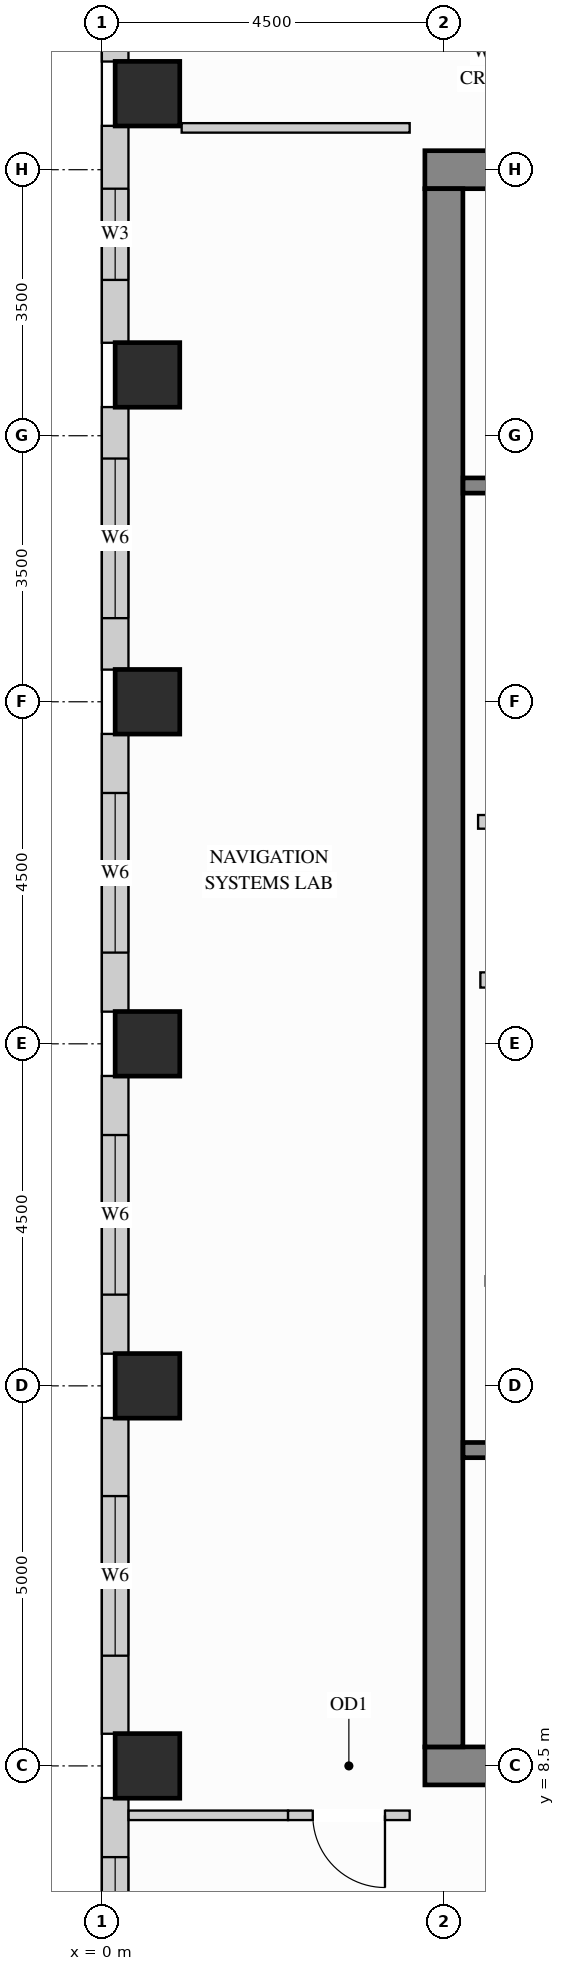
"""IFC4 building model, lengths in metres.
Left out: names, types, materials, properties, quantities, classifications, styles, units other than length and angle.
Written with IfcOpenShell. Run it as: python <this file> out.ifc"""

import sys

from ifc_helpers import new_model, si_unit, direction, frame, frame_2d, origin, origin_2d, place, context, subcontext, project, spatial, rectangle, extrude, source, transform, mapped, element, fill, save


model = new_model("IFC4")
c1 = context("Model", 3, precision=1e-05, world=origin(), true_north=direction((0.0, 1.0)))
c2 = subcontext(c1, "Body", "Model", "MODEL_VIEW")
j1 = project(units=[si_unit("LENGTHUNIT", "METRE"), si_unit("PLANEANGLEUNIT", "RADIAN")], contexts=[c1])
p1 = place(None, origin())
s1 = spatial("IfcSite", under=j1, at=p1, CompositionType="ELEMENT")
p2 = place(p1, origin())
s2 = spatial("IfcBuilding", under=s1, at=p2, CompositionType="ELEMENT")
p3 = place(p2, frame((0.0, 0.0, 255.6)))
s3 = spatial("IfcBuildingStorey", under=s2, at=p3, CompositionType="ELEMENT", Elevation=255.6)
m1 = source(origin(), c2, "Body", "SweptSolid", [
    extrude(rectangle(XDim=0.85, YDim=0.85, at=origin_2d()), origin(), (0.0, 0.0, 1.0), 3.4),
])
for number, where, z_axis, x_axis in (
    (1, (0.6, 13.5, 0.0), (0.0, 0.0, 1.0), (1.0, 0.0, 0.0)),
    (2, (0.6, 18.0, 0.0), (0.0, 0.0, 1.0), (1.0, 0.0, 0.0)),
    (3, (0.6, 22.5, 0.0), (0.0, 0.0, 1.0), (1.0, 0.0, 0.0)),
    (4, (0.6, 26.8, 0.0), (0.0, 0.0, 1.0), (1.0, 0.0, 0.0)),
    (5, (0.6, 30.5, 0.0), (0.0, 0.0, 1.0), (1.0, 0.0, 0.0)),
    (6, (0.6, 8.5, 0.0), (0.0, 0.0, 1.0), (1.0, 0.0, 0.0)),
):
    element("IfcColumn", number, at=place(p3, frame(where, z_axis=z_axis, x_axis=x_axis)), inside=s3, PredefinedType="COLUMN", context=c2, shape_type="MappedRepresentation", body=[
        mapped(m1, transform((0.0, 0.0, 0.0), x_axis=(1.0, 0.0, 0.0), y_axis=(0.0, 1.0, 0.0), z_axis=(0.0, 0.0, 1.0))),
    ])
m2 = source(origin(), c2, "Body", "SweptSolid", [
    extrude(rectangle(XDim=10.5, YDim=0.5, at=frame_2d((5.25, 0.0))), origin(), (0.0, 0.0, 1.0), 3.4),
])
for number, where, z_axis, x_axis in (
    (7, (4.25, 29.5, 0.0), (0.0, 0.0, 1.0), (1.0, 0.0, 0.0)),
    (8, (4.25, 8.5, 0.0), (0.0, 0.0, 1.0), (1.0, 0.0, 0.0)),
):
    element("IfcWall", number, at=place(p3, frame(where, z_axis=z_axis, x_axis=x_axis)), inside=s3, PredefinedType="SHEAR", context=c2, shape_type="MappedRepresentation", body=[
        mapped(m2, transform((0.0, 0.0, 0.0), x_axis=(1.0, 0.0, 0.0), y_axis=(0.0, 1.0, 0.0), z_axis=(0.0, 0.0, 1.0))),
    ])
m3 = source(origin(), c2, "Body", "SweptSolid", [
    extrude(rectangle(XDim=20.5, YDim=0.5, at=frame_2d((10.25, 0.0))), origin(), (0.0, 0.0, 1.0), 3.4),
])
p4 = place(p3, frame((4.5, 8.75, 0.0), z_axis=(0.0, 0.0, 1.0), x_axis=(0.0, 1.0, 0.0)))
e9 = element("IfcWall", 9, at=p4, inside=s3, PredefinedType="SHEAR", context=c2, shape_type="MappedRepresentation", body=[
    mapped(m3, transform((0.0, 0.0, 0.0), x_axis=(1.0, 0.0, 0.0), y_axis=(0.0, 1.0, 0.0), z_axis=(0.0, 0.0, 1.0))),
])
m4 = source(origin(), c2, "Body", "SweptSolid", [
    extrude(rectangle(XDim=0.527, YDim=0.35, at=frame_2d((0.263, 0.0))), origin(), (0.0, 0.0, 1.0), 3.385),
])
p5 = place(p3, frame((0.175, 31.45, 0.0), z_axis=(0.0, 0.0, 1.0), x_axis=(0.0, -1.0, 0.0)))
e10 = element("IfcWall", 10, at=p5, inside=s3, PredefinedType="SOLIDWALL", context=c2, shape_type="MappedRepresentation", body=[
    mapped(m4, transform((0.0, 0.0, 0.0), x_axis=(1.0, 0.0, 0.0), y_axis=(0.0, 1.0, 0.0), z_axis=(0.0, 0.0, 1.0))),
])
p6 = place(p3, frame((0.175, 30.077, 0.0), z_axis=(0.0, 0.0, 1.0), x_axis=(0.0, -1.0, 0.0)))
e11 = element("IfcWall", 11, at=p6, inside=s3, PredefinedType="SOLIDWALL", context=c2, shape_type="SweptSolid", body=[
    extrude(rectangle(XDim=2.854, YDim=0.35, at=frame_2d((1.427, 0.0))), origin(), (0.0, 0.0, 1.0), 3.385),
])
p7 = place(p6, frame((0.827, 0.0, 0.78)))
e12 = element("IfcOpeningElement", 12, at=p7, cuts=e11, PredefinedType="OPENING", context=c2, shape_type="SweptSolid", body=[
    extrude(rectangle(XDim=1.2, YDim=2.25, at=frame_2d((0.6, 1.125))), frame((0.0, 0.185, 0.0), z_axis=(0.0, -1.0, 0.0), x_axis=(1.0, 0.0, 0.0)), (0.0, 0.0, 1.0), 0.37),
])
p8 = place(p3, frame((0.175, 26.377, 0.0), z_axis=(0.0, 0.0, 1.0), x_axis=(0.0, -1.0, 0.0)))
e13 = element("IfcWall", 13, at=p8, inside=s3, PredefinedType="SOLIDWALL", context=c2, shape_type="SweptSolid", body=[
    extrude(rectangle(XDim=3.454, YDim=0.35, at=frame_2d((1.727, 0.0))), origin(), (0.0, 0.0, 1.0), 3.385),
])
p9 = place(p8, frame((0.677, 0.0, 0.78)))
e14 = element("IfcOpeningElement", 14, at=p9, cuts=e13, PredefinedType="OPENING", context=c2, shape_type="SweptSolid", body=[
    extrude(rectangle(XDim=2.1, YDim=2.25, at=frame_2d((1.05, 1.125))), frame((0.0, 0.185, 0.0), z_axis=(0.0, -1.0, 0.0), x_axis=(1.0, 0.0, 0.0)), (0.0, 0.0, 1.0), 0.37),
])
p10 = place(p3, frame((0.175, 22.077, 0.0), z_axis=(0.0, 0.0, 1.0), x_axis=(0.0, -1.0, 0.0)))
e15 = element("IfcWall", 15, at=p10, inside=s3, PredefinedType="SOLIDWALL", context=c2, shape_type="SweptSolid", body=[
    extrude(rectangle(XDim=3.654, YDim=0.35, at=frame_2d((1.827, 0.0))), origin(), (0.0, 0.0, 1.0), 3.385),
])
p11 = place(p10, frame((0.777, 0.0, 0.78)))
e16 = element("IfcOpeningElement", 16, at=p11, cuts=e15, PredefinedType="OPENING", context=c2, shape_type="SweptSolid", body=[
    extrude(rectangle(XDim=2.1, YDim=2.25, at=frame_2d((1.05, 1.125))), frame((0.0, 0.185, 0.0), z_axis=(0.0, -1.0, 0.0), x_axis=(1.0, 0.0, 0.0)), (0.0, 0.0, 1.0), 0.37),
])
p12 = place(p3, frame((0.175, 17.577, 0.0), z_axis=(0.0, 0.0, 1.0), x_axis=(0.0, -1.0, 0.0)))
e17 = element("IfcWall", 17, at=p12, inside=s3, PredefinedType="SOLIDWALL", context=c2, shape_type="SweptSolid", body=[
    extrude(rectangle(XDim=3.654, YDim=0.35, at=frame_2d((1.827, 0.0))), origin(), (0.0, 0.0, 1.0), 3.385),
])
p13 = place(p12, frame((0.777, 0.0, 0.78)))
e18 = element("IfcOpeningElement", 18, at=p13, cuts=e17, PredefinedType="OPENING", context=c2, shape_type="SweptSolid", body=[
    extrude(rectangle(XDim=2.1, YDim=2.25, at=frame_2d((1.05, 1.125))), frame((0.0, 0.185, 0.0), z_axis=(0.0, -1.0, 0.0), x_axis=(1.0, 0.0, 0.0)), (0.0, 0.0, 1.0), 0.37),
])
p14 = place(p3, frame((0.175, 13.077, 0.0), z_axis=(0.0, 0.0, 1.0), x_axis=(0.0, -1.0, 0.0)))
e19 = element("IfcWall", 19, at=p14, inside=s3, PredefinedType="SOLIDWALL", context=c2, shape_type="SweptSolid", body=[
    extrude(rectangle(XDim=4.154, YDim=0.35, at=frame_2d((2.077, 0.0))), origin(), (0.0, 0.0, 1.0), 3.385),
])
p15 = place(p14, frame((1.027, 0.0, 0.78)))
e20 = element("IfcOpeningElement", 20, at=p15, cuts=e19, PredefinedType="OPENING", context=c2, shape_type="SweptSolid", body=[
    extrude(rectangle(XDim=2.1, YDim=2.25, at=frame_2d((1.05, 1.125))), frame((0.0, 0.185, 0.0), z_axis=(0.0, -1.0, 0.0), x_axis=(1.0, 0.0, 0.0)), (0.0, 0.0, 1.0), 0.37),
])
p16 = place(p3, frame((0.175, 8.077, 0.0), z_axis=(0.0, 0.0, 1.0), x_axis=(0.0, -1.0, 0.0)))
e21 = element("IfcWall", 21, at=p16, inside=s3, PredefinedType="SOLIDWALL", context=c2, shape_type="SweptSolid", body=[
    extrude(rectangle(XDim=4.154, YDim=0.35, at=frame_2d((2.077, 0.0))), origin(), (0.0, 0.0, 1.0), 3.385),
])
p17 = place(p16, frame((0.777, 0.0, 0.78)))
e22 = element("IfcOpeningElement", 22, at=p17, cuts=e21, PredefinedType="OPENING", context=c2, shape_type="SweptSolid", body=[
    extrude(rectangle(XDim=2.1, YDim=2.25, at=frame_2d((1.05, 1.125))), frame((0.0, 0.185, 0.0), z_axis=(0.0, -1.0, 0.0), x_axis=(1.0, 0.0, 0.0)), (0.0, 0.0, 1.0), 0.37),
])
m5 = source(origin(), c2, "Body", "SweptSolid", [
    extrude(rectangle(XDim=2.2, YDim=0.18, at=frame_2d((1.1, 0.0))), origin(), (0.0, 0.0, 1.0), 3.385),
])
p18 = place(p3, frame((4.95, 20.92, 0.0), z_axis=(0.0, 0.0, 1.0), x_axis=(1.0, 0.0, 0.0)))
e23 = element("IfcWall", 23, at=p18, inside=s3, PredefinedType="PARTITIONING", context=c2, shape_type="MappedRepresentation", body=[
    mapped(m5, transform((0.0, 0.0, 0.0), x_axis=(1.0, 0.0, 0.0), y_axis=(0.0, 1.0, 0.0), z_axis=(0.0, 0.0, 1.0))),
])
p19 = place(p3, frame((5.05, 14.88, 0.0), z_axis=(0.0, 0.0, 1.0), x_axis=(1.0, 0.0, 0.0)))
e24 = element("IfcWall", 24, at=p19, inside=s3, PredefinedType="PARTITIONING", context=c2, shape_type="SweptSolid", body=[
    extrude(rectangle(XDim=2.35, YDim=0.125, at=frame_2d((1.175, 0.0))), origin(), (0.0, 0.0, 1.0), 3.385),
])
p20 = place(p19, frame((0.7, 0.0, 0.0)))
e25 = element("IfcOpeningElement", 25, at=p20, cuts=e24, PredefinedType="OPENING", context=c2, shape_type="SweptSolid", body=[
    extrude(rectangle(XDim=0.85, YDim=2.1, at=frame_2d((0.425, 1.05))), frame((0.0, 0.073, 0.0), z_axis=(0.0, -1.0, 0.0), x_axis=(1.0, 0.0, 0.0)), (0.0, 0.0, 1.0), 0.145),
])
m6 = source(origin(), c2, "Body", "SweptSolid", [
    extrude(rectangle(XDim=3.0, YDim=0.125, at=frame_2d((1.5, 0.0))), origin(), (0.0, 0.0, 1.0), 3.385),
])
p21 = place(p3, frame((1.05, 30.05, 0.0), z_axis=(0.0, 0.0, 1.0), x_axis=(1.0, 0.0, 0.0)))
e26 = element("IfcWall", 26, at=p21, inside=s3, PredefinedType="PARTITIONING", context=c2, shape_type="MappedRepresentation", body=[
    mapped(m6, transform((0.0, 0.0, 0.0), x_axis=(1.0, 0.0, 0.0), y_axis=(0.0, 1.0, 0.0), z_axis=(0.0, 0.0, 1.0))),
])
m7 = source(origin(), c2, "Body", "SweptSolid", [
    extrude(rectangle(XDim=2.098, YDim=0.125, at=frame_2d((1.049, 0.0))), origin(), (0.0, 0.0, 1.0), 3.385),
])
p22 = place(p3, frame((0.352, 7.85, 0.0), z_axis=(0.0, 0.0, 1.0), x_axis=(1.0, 0.0, 0.0)))
e27 = element("IfcWall", 27, at=p22, inside=s3, PredefinedType="PARTITIONING", context=c2, shape_type="MappedRepresentation", body=[
    mapped(m7, transform((0.0, 0.0, 0.0), x_axis=(1.0, 0.0, 0.0), y_axis=(0.0, 1.0, 0.0), z_axis=(0.0, 0.0, 1.0))),
])
p23 = place(p3, frame((2.45, 7.85, 0.0), z_axis=(0.0, 0.0, 1.0), x_axis=(1.0, 0.0, 0.0)))
e28 = element("IfcWall", 28, at=p23, inside=s3, PredefinedType="PARTITIONING", context=c2, shape_type="SweptSolid", body=[
    extrude(rectangle(XDim=1.6, YDim=0.125, at=frame_2d((0.8, 0.0))), origin(), (0.0, 0.0, 1.0), 3.385),
])
p24 = place(p23, frame((0.325, 0.0, 0.0)))
e29 = element("IfcOpeningElement", 29, at=p24, cuts=e28, PredefinedType="OPENING", context=c2, shape_type="SweptSolid", body=[
    extrude(rectangle(XDim=0.95, YDim=2.15, at=frame_2d((0.475, 1.075))), frame((0.0, 0.073, 0.0), z_axis=(0.0, -1.0, 0.0), x_axis=(1.0, 0.0, 0.0)), (0.0, 0.0, 1.0), 0.145),
])
m8 = source(origin(), c2, "Body", "SweptSolid", [
    extrude(rectangle(XDim=2.09, YDim=0.2, at=frame_2d((1.045, 0.0))), origin(), (0.0, 0.0, 1.0), 3.385),
])
p25 = place(p3, frame((4.98, 18.84, 0.0), z_axis=(0.0, 0.0, 1.0), x_axis=(1.0, 0.0, 0.0)))
e30 = element("IfcWall", 30, at=p25, inside=s3, PredefinedType="PARTITIONING", context=c2, shape_type="MappedRepresentation", body=[
    mapped(m8, transform((0.0, 0.0, 0.0), x_axis=(1.0, 0.0, 0.0), y_axis=(0.0, 1.0, 0.0), z_axis=(0.0, 0.0, 1.0))),
])
p26 = place(p3, frame((4.752, 12.655, 0.0), z_axis=(0.0, 0.0, 1.0), x_axis=(1.0, 0.0, 0.0)))
e31 = element("IfcWall", 31, at=p26, inside=s3, PredefinedType="SHEAR", context=c2, shape_type="SweptSolid", body=[
    extrude(rectangle(XDim=7.653, YDim=0.2, at=frame_2d((3.827, 0.0))), origin(), (0.0, 0.0, 1.0), 3.4),
])
p27 = place(p26, frame((0.4, 0.0, 0.0)))
e32 = element("IfcOpeningElement", 32, at=p27, cuts=e31, PredefinedType="OPENING", context=c2, shape_type="SweptSolid", body=[
    extrude(rectangle(XDim=1.1, YDim=2.15, at=frame_2d((0.55, 1.075))), frame((0.0, 0.11, 0.0), z_axis=(0.0, -1.0, 0.0), x_axis=(1.0, 0.0, 0.0)), (0.0, 0.0, 1.0), 0.22),
])
p28 = place(p3, frame((4.752, 25.345, 0.0), z_axis=(0.0, 0.0, 1.0), x_axis=(1.0, 0.0, 0.0)))
e33 = element("IfcWall", 33, at=p28, inside=s3, PredefinedType="SHEAR", context=c2, shape_type="SweptSolid", body=[
    extrude(rectangle(XDim=7.653, YDim=0.2, at=frame_2d((3.827, 0.0))), origin(), (0.0, 0.0, 1.0), 3.4),
])
p29 = place(p28, frame((0.4, 0.0, 0.0)))
e34 = element("IfcOpeningElement", 34, at=p29, cuts=e33, PredefinedType="OPENING", context=c2, shape_type="SweptSolid", body=[
    extrude(rectangle(XDim=1.1, YDim=2.15, at=frame_2d((0.55, 1.075))), frame((0.0, 0.11, 0.0), z_axis=(0.0, -1.0, 0.0), x_axis=(1.0, 0.0, 0.0)), (0.0, 0.0, 1.0), 0.22),
])
m9 = source(origin(), c2, "Body", "SweptSolid", [
    extrude(rectangle(XDim=0.95, YDim=2.15, at=frame_2d((0.475, 1.075))), frame((0.0, 0.025, 0.0), z_axis=(0.0, -1.0, 0.0), x_axis=(1.0, 0.0, 0.0)), (0.0, 0.0, 1.0), 0.05),
])
p30 = place(p24, origin())
e35 = element("IfcDoor", 35, at=p30, inside=s3, OperationType="SINGLE_SWING_RIGHT", PredefinedType="DOOR", context=c2, shape_type="MappedRepresentation", body=[
    mapped(m9, transform((0.0, 0.0, 0.0), x_axis=(1.0, 0.0, 0.0), y_axis=(0.0, 1.0, 0.0), z_axis=(0.0, 0.0, 1.0))),
])
fill(e29, e35)
m10 = source(origin(), c2, "Body", "SweptSolid", [
    extrude(rectangle(XDim=1.2, YDim=2.25, at=frame_2d((0.6, 1.125))), frame((0.0, 0.03, 0.0), z_axis=(0.0, -1.0, 0.0), x_axis=(1.0, 0.0, 0.0)), (0.0, 0.0, 1.0), 0.06),
])
p31 = place(p7, origin())
e36 = element("IfcWindow", 36, at=p31, inside=s3, PartitioningType="SINGLE_PANEL", PredefinedType="WINDOW", context=c2, shape_type="MappedRepresentation", body=[
    mapped(m10, transform((0.0, 0.0, 0.0), x_axis=(1.0, 0.0, 0.0), y_axis=(0.0, 1.0, 0.0), z_axis=(0.0, 0.0, 1.0))),
])
fill(e12, e36)
m11 = source(origin(), c2, "Body", "SweptSolid", [
    extrude(rectangle(XDim=2.1, YDim=2.25, at=frame_2d((1.05, 1.125))), frame((0.0, 0.03, 0.0), z_axis=(0.0, -1.0, 0.0), x_axis=(1.0, 0.0, 0.0)), (0.0, 0.0, 1.0), 0.06),
])
p32 = place(p9, origin())
e37 = element("IfcWindow", 37, at=p32, inside=s3, PartitioningType="SINGLE_PANEL", PredefinedType="WINDOW", context=c2, shape_type="MappedRepresentation", body=[
    mapped(m11, transform((0.0, 0.0, 0.0), x_axis=(1.0, 0.0, 0.0), y_axis=(0.0, 1.0, 0.0), z_axis=(0.0, 0.0, 1.0))),
])
fill(e14, e37)
p33 = place(p11, origin())
e38 = element("IfcWindow", 38, at=p33, inside=s3, PartitioningType="SINGLE_PANEL", PredefinedType="WINDOW", context=c2, shape_type="MappedRepresentation", body=[
    mapped(m11, transform((0.0, 0.0, 0.0), x_axis=(1.0, 0.0, 0.0), y_axis=(0.0, 1.0, 0.0), z_axis=(0.0, 0.0, 1.0))),
])
fill(e16, e38)
p34 = place(p13, origin())
e39 = element("IfcWindow", 39, at=p34, inside=s3, PartitioningType="SINGLE_PANEL", PredefinedType="WINDOW", context=c2, shape_type="MappedRepresentation", body=[
    mapped(m11, transform((0.0, 0.0, 0.0), x_axis=(1.0, 0.0, 0.0), y_axis=(0.0, 1.0, 0.0), z_axis=(0.0, 0.0, 1.0))),
])
fill(e18, e39)
p35 = place(p15, origin())
e40 = element("IfcWindow", 40, at=p35, inside=s3, PartitioningType="SINGLE_PANEL", PredefinedType="WINDOW", context=c2, shape_type="MappedRepresentation", body=[
    mapped(m11, transform((0.0, 0.0, 0.0), x_axis=(1.0, 0.0, 0.0), y_axis=(0.0, 1.0, 0.0), z_axis=(0.0, 0.0, 1.0))),
])
fill(e20, e40)
p36 = place(p17, origin())
e41 = element("IfcWindow", 41, at=p36, inside=s3, PartitioningType="SINGLE_PANEL", PredefinedType="WINDOW", context=c2, shape_type="MappedRepresentation", body=[
    mapped(m11, transform((0.0, 0.0, 0.0), x_axis=(1.0, 0.0, 0.0), y_axis=(0.0, 1.0, 0.0), z_axis=(0.0, 0.0, 1.0))),
])
fill(e22, e41)
save(model, sys.argv[1])
